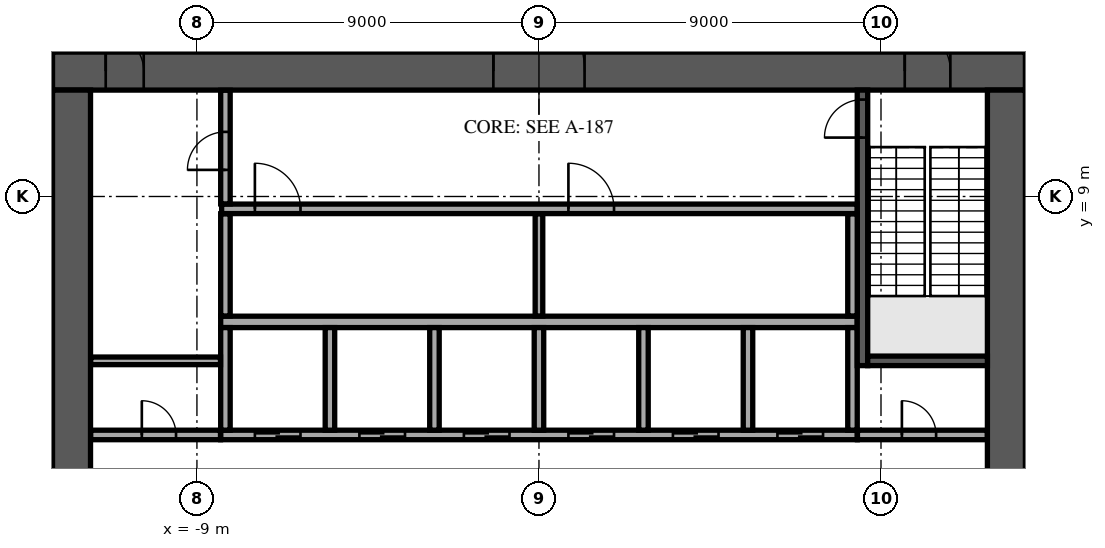
"""IFC4 building model, lengths in metres.
Left out: names, types, materials, properties, quantities, classifications, styles, units other than length and angle.
Written with IfcOpenShell. Run it as: python <this file> out.ifc"""

import sys

from ifc_helpers import new_model, si_unit, direction, frame, frame_2d, origin, place, context, subcontext, project, spatial, rectangle, extrude, element, fill, save


model = new_model("IFC4")
c1 = context("Model", 3, precision=1e-05, world=origin(), true_north=direction((0.0, 1.0)))
c2 = subcontext(c1, "Body", "Model", "MODEL_VIEW")
j1 = project(units=[si_unit("LENGTHUNIT", "METRE"), si_unit("PLANEANGLEUNIT", "RADIAN")], contexts=[c1])
p1 = place(None, origin())
s1 = spatial("IfcSite", under=j1, at=p1, CompositionType="ELEMENT")
p2 = place(p1, origin())
s2 = spatial("IfcBuilding", under=s1, at=p2, CompositionType="ELEMENT")
p3 = place(p2, frame((0.0, 0.0, 183.7)))
s3 = spatial("IfcBuildingStorey", under=s2, at=p3, CompositionType="ELEMENT", Elevation=183.7)
p4 = place(p3, frame((-12.8, 12.3, 0.0), z_axis=(0.0, 0.0, 1.0), x_axis=(1.0, 0.0, 0.0)))
e1 = element("IfcWall", 1, at=p4, inside=s3, PredefinedType="SHEAR", context=c2, shape_type="SweptSolid", body=[
    extrude(rectangle(XDim=25.6, YDim=1.0, at=frame_2d((12.8, 0.0))), origin(), (0.0, 0.0, 1.0), 5.22),
])
p5 = place(p4, frame((11.6, 0.0, 0.0)))
e2 = element("IfcOpeningElement", 2, at=p5, cuts=e1, PredefinedType="OPENING", context=c2, shape_type="SweptSolid", body=[
    extrude(rectangle(XDim=2.4, YDim=2.4, at=frame_2d((1.2, 1.2))), frame((0.0, 0.51, 0.0), z_axis=(0.0, -1.0, 0.0), x_axis=(1.0, 0.0, 0.0)), (0.0, 0.0, 1.0), 1.02),
])
p6 = place(p4, frame((22.425, 0.0, 0.0)))
e3 = element("IfcOpeningElement", 3, at=p6, cuts=e1, PredefinedType="OPENING", context=c2, shape_type="SweptSolid", body=[
    extrude(rectangle(XDim=1.2, YDim=2.1, at=frame_2d((0.6, 1.05))), frame((0.0, 0.51, 0.0), z_axis=(0.0, -1.0, 0.0), x_axis=(1.0, 0.0, 0.0)), (0.0, 0.0, 1.0), 1.02),
])
p7 = place(p4, frame((1.4, 0.0, 0.0)))
e4 = element("IfcOpeningElement", 4, at=p7, cuts=e1, PredefinedType="OPENING", context=c2, shape_type="SweptSolid", body=[
    extrude(rectangle(XDim=1.0, YDim=2.1, at=frame_2d((0.5, 1.05))), frame((0.0, 0.51, 0.0), z_axis=(0.0, -1.0, 0.0), x_axis=(1.0, 0.0, 0.0)), (0.0, 0.0, 1.0), 1.02),
])
p8 = place(p3, frame((12.3, -11.8, 0.0), z_axis=(0.0, 0.0, 1.0), x_axis=(0.0, 1.0, 0.0)))
e5 = element("IfcWall", 5, at=p8, inside=s3, PredefinedType="SHEAR", context=c2, shape_type="SweptSolid", body=[
    extrude(rectangle(XDim=23.6, YDim=1.0, at=frame_2d((11.8, 0.0))), origin(), (0.0, 0.0, 1.0), 5.22),
])
p9 = place(p8, frame((10.6, 0.0, 0.0)))
e6 = element("IfcOpeningElement", 6, at=p9, cuts=e5, PredefinedType="OPENING", context=c2, shape_type="SweptSolid", body=[
    extrude(rectangle(XDim=2.4, YDim=2.4, at=frame_2d((1.2, 1.2))), frame((0.0, 0.51, 0.0), z_axis=(0.0, -1.0, 0.0), x_axis=(1.0, 0.0, 0.0)), (0.0, 0.0, 1.0), 1.02),
])
p10 = place(p3, frame((-12.3, -11.8, 0.0), z_axis=(0.0, 0.0, 1.0), x_axis=(0.0, 1.0, 0.0)))
e7 = element("IfcWall", 7, at=p10, inside=s3, PredefinedType="SHEAR", context=c2, shape_type="SweptSolid", body=[
    extrude(rectangle(XDim=23.6, YDim=1.0, at=frame_2d((11.8, 0.0))), origin(), (0.0, 0.0, 1.0), 5.22),
])
p11 = place(p10, frame((10.6, 0.0, 0.0)))
e8 = element("IfcOpeningElement", 8, at=p11, cuts=e7, PredefinedType="OPENING", context=c2, shape_type="SweptSolid", body=[
    extrude(rectangle(XDim=2.4, YDim=2.4, at=frame_2d((1.2, 1.2))), frame((0.0, 0.51, 0.0), z_axis=(0.0, -1.0, 0.0), x_axis=(1.0, 0.0, 0.0)), (0.0, 0.0, 1.0), 1.02),
])
p12 = place(p3, frame((-8.375, 5.7, 0.0), z_axis=(0.0, 0.0, 1.0), x_axis=(1.0, 0.0, 0.0)))
e9 = element("IfcWall", 9, at=p12, inside=s3, PredefinedType="SOLIDWALL", context=c2, shape_type="SweptSolid", body=[
    extrude(rectangle(XDim=16.75, YDim=0.3, at=frame_2d((8.375, 0.0))), origin(), (0.0, 0.0, 1.0), 5.22),
])
p13 = place(p3, frame((-8.375, 2.725, 0.0), z_axis=(0.0, 0.0, 1.0), x_axis=(1.0, 0.0, 0.0)))
e10 = element("IfcWall", 10, at=p13, inside=s3, PredefinedType="SOLIDWALL", context=c2, shape_type="SweptSolid", body=[
    extrude(rectangle(XDim=16.75, YDim=0.25, at=frame_2d((8.375, 0.0))), origin(), (0.0, 0.0, 1.0), 5.22),
])
p14 = place(p13, frame((0.9, 0.0, 0.0)))
e11 = element("IfcOpeningElement", 11, at=p14, cuts=e10, PredefinedType="OPENING", context=c2, shape_type="SweptSolid", body=[
    extrude(rectangle(XDim=1.2, YDim=2.1, at=frame_2d((0.6, 1.05))), frame((0.0, 0.135, 0.0), z_axis=(0.0, -1.0, 0.0), x_axis=(1.0, 0.0, 0.0)), (0.0, 0.0, 1.0), 0.27),
])
p15 = place(p13, frame((3.65, 0.0, 0.0)))
e12 = element("IfcOpeningElement", 12, at=p15, cuts=e10, PredefinedType="OPENING", context=c2, shape_type="SweptSolid", body=[
    extrude(rectangle(XDim=1.2, YDim=2.1, at=frame_2d((0.6, 1.05))), frame((0.0, 0.135, 0.0), z_axis=(0.0, -1.0, 0.0), x_axis=(1.0, 0.0, 0.0)), (0.0, 0.0, 1.0), 0.27),
])
p16 = place(p13, frame((6.4, 0.0, 0.0)))
e13 = element("IfcOpeningElement", 13, at=p16, cuts=e10, PredefinedType="OPENING", context=c2, shape_type="SweptSolid", body=[
    extrude(rectangle(XDim=1.2, YDim=2.1, at=frame_2d((0.6, 1.05))), frame((0.0, 0.135, 0.0), z_axis=(0.0, -1.0, 0.0), x_axis=(1.0, 0.0, 0.0)), (0.0, 0.0, 1.0), 0.27),
])
p17 = place(p13, frame((9.15, 0.0, 0.0)))
e14 = element("IfcOpeningElement", 14, at=p17, cuts=e10, PredefinedType="OPENING", context=c2, shape_type="SweptSolid", body=[
    extrude(rectangle(XDim=1.2, YDim=2.1, at=frame_2d((0.6, 1.05))), frame((0.0, 0.135, 0.0), z_axis=(0.0, -1.0, 0.0), x_axis=(1.0, 0.0, 0.0)), (0.0, 0.0, 1.0), 0.27),
])
p18 = place(p13, frame((11.9, 0.0, 0.0)))
e15 = element("IfcOpeningElement", 15, at=p18, cuts=e10, PredefinedType="OPENING", context=c2, shape_type="SweptSolid", body=[
    extrude(rectangle(XDim=1.2, YDim=2.1, at=frame_2d((0.6, 1.05))), frame((0.0, 0.135, 0.0), z_axis=(0.0, -1.0, 0.0), x_axis=(1.0, 0.0, 0.0)), (0.0, 0.0, 1.0), 0.27),
])
p19 = place(p13, frame((14.65, 0.0, 0.0)))
e16 = element("IfcOpeningElement", 16, at=p19, cuts=e10, PredefinedType="OPENING", context=c2, shape_type="SweptSolid", body=[
    extrude(rectangle(XDim=1.2, YDim=2.1, at=frame_2d((0.6, 1.05))), frame((0.0, 0.135, 0.0), z_axis=(0.0, -1.0, 0.0), x_axis=(1.0, 0.0, 0.0)), (0.0, 0.0, 1.0), 0.27),
])
for number, where, z_axis, x_axis in (
    (17, (-8.25, 2.85, 0.0), (0.0, 0.0, 1.0), (0.0, 1.0, 0.0)),
    (18, (-5.5, 2.85, 0.0), (0.0, 0.0, 1.0), (0.0, 1.0, 0.0)),
    (19, (-2.75, 2.85, 0.0), (0.0, 0.0, 1.0), (0.0, 1.0, 0.0)),
    (20, (0.0, 2.85, 0.0), (0.0, 0.0, 1.0), (0.0, 1.0, 0.0)),
    (21, (2.75, 2.85, 0.0), (0.0, 0.0, 1.0), (0.0, 1.0, 0.0)),
    (22, (5.5, 2.85, 0.0), (0.0, 0.0, 1.0), (0.0, 1.0, 0.0)),
    (23, (8.25, 2.85, 0.0), (0.0, 0.0, 1.0), (0.0, 1.0, 0.0)),
):
    element("IfcWall", number, at=place(p3, frame(where, z_axis=z_axis, x_axis=x_axis)), inside=s3, PredefinedType="SOLIDWALL", context=c2, shape_type="SweptSolid", body=[
        extrude(rectangle(XDim=2.7, YDim=0.25, at=frame_2d((1.35, 0.0))), origin(), (0.0, 0.0, 1.0), 5.22),
    ])
p20 = place(p3, frame((8.512, 4.55, 0.0), z_axis=(0.0, 0.0, 1.0), x_axis=(0.0, 1.0, 0.0)))
e24 = element("IfcWall", 24, at=p20, inside=s3, PredefinedType="SOLIDWALL", context=c2, shape_type="SweptSolid", body=[
    extrude(rectangle(XDim=7.25, YDim=0.275, at=frame_2d((3.625, 0.0))), origin(), (0.0, 0.0, 1.0), 5.22),
])
p21 = place(p20, frame((6.0, 0.0, 0.0)))
e25 = element("IfcOpeningElement", 25, at=p21, cuts=e24, PredefinedType="OPENING", context=c2, shape_type="SweptSolid", body=[
    extrude(rectangle(XDim=1.0, YDim=2.1, at=frame_2d((0.5, 1.05))), frame((0.0, 0.147, 0.0), z_axis=(0.0, -1.0, 0.0), x_axis=(1.0, 0.0, 0.0)), (0.0, 0.0, 1.0), 0.295),
])
p22 = place(p3, frame((8.65, 4.675, 0.0), z_axis=(0.0, 0.0, 1.0), x_axis=(1.0, 0.0, 0.0)))
e26 = element("IfcWall", 26, at=p22, inside=s3, PredefinedType="SOLIDWALL", context=c2, shape_type="SweptSolid", body=[
    extrude(rectangle(XDim=3.15, YDim=0.25, at=frame_2d((1.575, 0.0))), origin(), (0.0, 0.0, 1.0), 5.22),
])
p23 = place(p3, frame((-11.795, 2.725, 0.0), z_axis=(0.0, 0.0, 1.0), x_axis=(1.0, 0.0, 0.0)))
e27 = element("IfcWall", 27, at=p23, inside=s3, PredefinedType="PARTITIONING", context=c2, shape_type="SweptSolid", body=[
    extrude(rectangle(XDim=3.415, YDim=0.25, at=frame_2d((1.708, 0.0))), origin(), (0.0, 0.0, 1.0), 5.22),
])
p24 = place(p23, frame((1.345, 0.0, 0.0)))
e28 = element("IfcOpeningElement", 28, at=p24, cuts=e27, PredefinedType="OPENING", context=c2, shape_type="SweptSolid", body=[
    extrude(rectangle(XDim=0.9, YDim=2.1, at=frame_2d((0.45, 1.05))), frame((0.0, 0.135, 0.0), z_axis=(0.0, -1.0, 0.0), x_axis=(1.0, 0.0, 0.0)), (0.0, 0.0, 1.0), 0.27),
])
p25 = place(p3, frame((8.38, 2.725, 0.0), z_axis=(0.0, 0.0, 1.0), x_axis=(1.0, 0.0, 0.0)))
e29 = element("IfcWall", 29, at=p25, inside=s3, PredefinedType="PARTITIONING", context=c2, shape_type="SweptSolid", body=[
    extrude(rectangle(XDim=3.415, YDim=0.25, at=frame_2d((1.708, 0.0))), origin(), (0.0, 0.0, 1.0), 5.22),
])
p26 = place(p25, frame((1.17, 0.0, 0.0)))
e30 = element("IfcOpeningElement", 30, at=p26, cuts=e29, PredefinedType="OPENING", context=c2, shape_type="SweptSolid", body=[
    extrude(rectangle(XDim=0.9, YDim=2.1, at=frame_2d((0.45, 1.05))), frame((0.0, 0.135, 0.0), z_axis=(0.0, -1.0, 0.0), x_axis=(1.0, 0.0, 0.0)), (0.0, 0.0, 1.0), 0.27),
])
p27 = place(p3, frame((-11.795, 4.675, 0.0), z_axis=(0.0, 0.0, 1.0), x_axis=(1.0, 0.0, 0.0)))
e31 = element("IfcWall", 31, at=p27, inside=s3, PredefinedType="PARTITIONING", context=c2, shape_type="SweptSolid", body=[
    extrude(rectangle(XDim=3.415, YDim=0.2, at=frame_2d((1.708, 0.0))), origin(), (0.0, 0.0, 1.0), 5.22),
])
p28 = place(p3, frame((-8.25, 5.855, 0.0), z_axis=(0.0, 0.0, 1.0), x_axis=(0.0, 1.0, 0.0)))
e32 = element("IfcWall", 32, at=p28, inside=s3, PredefinedType="PARTITIONING", context=c2, shape_type="SweptSolid", body=[
    extrude(rectangle(XDim=2.69, YDim=0.25, at=frame_2d((1.345, 0.0))), origin(), (0.0, 0.0, 1.0), 5.22),
])
p29 = place(p3, frame((0.0, 5.855, 0.0), z_axis=(0.0, 0.0, 1.0), x_axis=(0.0, 1.0, 0.0)))
e33 = element("IfcWall", 33, at=p29, inside=s3, PredefinedType="PARTITIONING", context=c2, shape_type="SweptSolid", body=[
    extrude(rectangle(XDim=2.69, YDim=0.2, at=frame_2d((1.345, 0.0))), origin(), (0.0, 0.0, 1.0), 5.22),
])
p30 = place(p3, frame((8.25, 5.855, 0.0), z_axis=(0.0, 0.0, 1.0), x_axis=(0.0, 1.0, 0.0)))
e34 = element("IfcWall", 34, at=p30, inside=s3, PredefinedType="PARTITIONING", context=c2, shape_type="SweptSolid", body=[
    extrude(rectangle(XDim=2.69, YDim=0.25, at=frame_2d((1.345, 0.0))), origin(), (0.0, 0.0, 1.0), 5.22),
])
p31 = place(p3, frame((-8.35, 8.675, 0.0), z_axis=(0.0, 0.0, 1.0), x_axis=(1.0, 0.0, 0.0)))
e35 = element("IfcWall", 35, at=p31, inside=s3, PredefinedType="PARTITIONING", context=c2, shape_type="SweptSolid", body=[
    extrude(rectangle(XDim=16.72, YDim=0.25, at=frame_2d((8.36, 0.0))), origin(), (0.0, 0.0, 1.0), 5.22),
])
p32 = place(p31, frame((0.875, 0.0, 0.0)))
e36 = element("IfcOpeningElement", 36, at=p32, cuts=e35, PredefinedType="OPENING", context=c2, shape_type="SweptSolid", body=[
    extrude(rectangle(XDim=1.2, YDim=2.1, at=frame_2d((0.6, 1.05))), frame((0.0, 0.135, 0.0), z_axis=(0.0, -1.0, 0.0), x_axis=(1.0, 0.0, 0.0)), (0.0, 0.0, 1.0), 0.27),
])
p33 = place(p31, frame((9.125, 0.0, 0.0)))
e37 = element("IfcOpeningElement", 37, at=p33, cuts=e35, PredefinedType="OPENING", context=c2, shape_type="SweptSolid", body=[
    extrude(rectangle(XDim=1.2, YDim=2.1, at=frame_2d((0.6, 1.05))), frame((0.0, 0.135, 0.0), z_axis=(0.0, -1.0, 0.0), x_axis=(1.0, 0.0, 0.0)), (0.0, 0.0, 1.0), 0.27),
])
p34 = place(p3, frame((-8.25, 8.805, 0.0), z_axis=(0.0, 0.0, 1.0), x_axis=(0.0, 1.0, 0.0)))
e38 = element("IfcWall", 38, at=p34, inside=s3, PredefinedType="PARTITIONING", context=c2, shape_type="SweptSolid", body=[
    extrude(rectangle(XDim=2.99, YDim=0.25, at=frame_2d((1.495, 0.0))), origin(), (0.0, 0.0, 1.0), 5.22),
])
p35 = place(p34, frame((0.895, 0.0, 0.0)))
e39 = element("IfcOpeningElement", 39, at=p35, cuts=e38, PredefinedType="OPENING", context=c2, shape_type="SweptSolid", body=[
    extrude(rectangle(XDim=1.0, YDim=2.1, at=frame_2d((0.5, 1.05))), frame((0.0, 0.135, 0.0), z_axis=(0.0, -1.0, 0.0), x_axis=(1.0, 0.0, 0.0)), (0.0, 0.0, 1.0), 0.27),
])
p36 = place(p3, frame((2.615, 35.702, 0.0), z_axis=(0.0, 0.0, 1.0), x_axis=(-0.777144452625, -0.629322254297, 0.0)))
e40 = element("IfcWall", 40, at=p36, inside=s3, PredefinedType="STANDARD", context=c2, shape_type="SweptSolid", body=[
    extrude(rectangle(XDim=49.376, YDim=0.6, at=frame_2d((24.688, 0.0))), origin(), (0.0, 0.0, 1.0), 5.22),
])
p37 = place(p36, frame((1.2, 0.0, 0.6)))
e41 = element("IfcOpeningElement", 41, at=p37, cuts=e40, PredefinedType="OPENING", context=c2, shape_type="SweptSolid", body=[
    extrude(rectangle(XDim=2.1, YDim=4.17, at=frame_2d((1.05, 2.085))), frame((0.0, 0.31, 0.0), z_axis=(0.0, -1.0, 0.0), x_axis=(1.0, 0.0, 0.0)), (0.0, 0.0, 1.0), 0.62),
])
p38 = place(p36, frame((5.7, 0.0, 0.6)))
e42 = element("IfcOpeningElement", 42, at=p38, cuts=e40, PredefinedType="OPENING", context=c2, shape_type="SweptSolid", body=[
    extrude(rectangle(XDim=2.1, YDim=4.17, at=frame_2d((1.05, 2.085))), frame((0.0, 0.31, 0.0), z_axis=(0.0, -1.0, 0.0), x_axis=(1.0, 0.0, 0.0)), (0.0, 0.0, 1.0), 0.62),
])
p39 = place(p36, frame((10.2, 0.0, 0.6)))
e43 = element("IfcOpeningElement", 43, at=p39, cuts=e40, PredefinedType="OPENING", context=c2, shape_type="SweptSolid", body=[
    extrude(rectangle(XDim=2.1, YDim=4.17, at=frame_2d((1.05, 2.085))), frame((0.0, 0.31, 0.0), z_axis=(0.0, -1.0, 0.0), x_axis=(1.0, 0.0, 0.0)), (0.0, 0.0, 1.0), 0.62),
])
p40 = place(p36, frame((19.2, 0.0, 0.6)))
e44 = element("IfcOpeningElement", 44, at=p40, cuts=e40, PredefinedType="OPENING", context=c2, shape_type="SweptSolid", body=[
    extrude(rectangle(XDim=2.1, YDim=4.17, at=frame_2d((1.05, 2.085))), frame((0.0, 0.31, 0.0), z_axis=(0.0, -1.0, 0.0), x_axis=(1.0, 0.0, 0.0)), (0.0, 0.0, 1.0), 0.62),
])
p41 = place(p36, frame((41.7, 0.0, 0.6)))
e45 = element("IfcOpeningElement", 45, at=p41, cuts=e40, PredefinedType="OPENING", context=c2, shape_type="SweptSolid", body=[
    extrude(rectangle(XDim=2.1, YDim=4.17, at=frame_2d((1.05, 2.085))), frame((0.0, 0.31, 0.0), z_axis=(0.0, -1.0, 0.0), x_axis=(1.0, 0.0, 0.0)), (0.0, 0.0, 1.0), 0.62),
])
p42 = place(p36, frame((46.138, 0.0, 0.6)))
e46 = element("IfcOpeningElement", 46, at=p42, cuts=e40, PredefinedType="OPENING", context=c2, shape_type="SweptSolid", body=[
    extrude(rectangle(XDim=2.1, YDim=4.17, at=frame_2d((1.05, 2.085))), frame((0.0, 0.31, 0.0), z_axis=(0.0, -1.0, 0.0), x_axis=(1.0, 0.0, 0.0)), (0.0, 0.0, 1.0), 0.62),
])
p43 = place(p3, frame((36.47, 2.156, 0.0), z_axis=(0.0, 0.0, 1.0), x_axis=(-0.62932061547, 0.777145779725, 0.0)))
e47 = element("IfcWall", 47, at=p43, inside=s3, PredefinedType="STANDARD", context=c2, shape_type="SweptSolid", body=[
    extrude(rectangle(XDim=42.176, YDim=0.6, at=frame_2d((21.088, 0.0))), origin(), (0.0, 0.0, 1.0), 5.22),
])
p44 = place(p43, frame((1.138, 0.0, 0.6)))
e48 = element("IfcOpeningElement", 48, at=p44, cuts=e47, PredefinedType="OPENING", context=c2, shape_type="SweptSolid", body=[
    extrude(rectangle(XDim=2.3, YDim=4.17, at=frame_2d((1.15, 2.085))), frame((0.0, 0.31, 0.0), z_axis=(0.0, -1.0, 0.0), x_axis=(1.0, 0.0, 0.0)), (0.0, 0.0, 1.0), 0.62),
])
p45 = place(p43, frame((5.776, 0.0, 0.6)))
e49 = element("IfcOpeningElement", 49, at=p45, cuts=e47, PredefinedType="OPENING", context=c2, shape_type="SweptSolid", body=[
    extrude(rectangle(XDim=2.3, YDim=4.17, at=frame_2d((1.15, 2.085))), frame((0.0, 0.31, 0.0), z_axis=(0.0, -1.0, 0.0), x_axis=(1.0, 0.0, 0.0)), (0.0, 0.0, 1.0), 0.62),
])
p46 = place(p43, frame((33.976, 0.0, 0.6)))
e50 = element("IfcOpeningElement", 50, at=p46, cuts=e47, PredefinedType="OPENING", context=c2, shape_type="SweptSolid", body=[
    extrude(rectangle(XDim=2.3, YDim=4.17, at=frame_2d((1.15, 2.085))), frame((0.0, 0.31, 0.0), z_axis=(0.0, -1.0, 0.0), x_axis=(1.0, 0.0, 0.0)), (0.0, 0.0, 1.0), 0.62),
])
p47 = place(p43, frame((38.676, 0.0, 0.6)))
e51 = element("IfcOpeningElement", 51, at=p47, cuts=e47, PredefinedType="OPENING", context=c2, shape_type="SweptSolid", body=[
    extrude(rectangle(XDim=2.3, YDim=4.17, at=frame_2d((1.15, 2.085))), frame((0.0, 0.31, 0.0), z_axis=(0.0, -1.0, 0.0), x_axis=(1.0, 0.0, 0.0)), (0.0, 0.0, 1.0), 0.62),
])
p48 = place(p5, origin())
e52 = element("IfcDoor", 52, at=p48, inside=s3, OperationType="SINGLE_SWING_LEFT", PredefinedType="DOOR", context=c2, shape_type="SweptSolid", body=[
    extrude(rectangle(XDim=2.4, YDim=2.4, at=frame_2d((1.2, 1.2))), frame((0.0, 0.025, 0.0), z_axis=(0.0, -1.0, 0.0), x_axis=(1.0, 0.0, 0.0)), (0.0, 0.0, 1.0), 0.05),
])
fill(e2, e52)
p49 = place(p6, origin())
e53 = element("IfcDoor", 53, at=p49, inside=s3, OperationType="SINGLE_SWING_LEFT", PredefinedType="DOOR", context=c2, shape_type="SweptSolid", body=[
    extrude(rectangle(XDim=1.2, YDim=2.1, at=frame_2d((0.6, 1.05))), frame((0.0, 0.025, 0.0), z_axis=(0.0, -1.0, 0.0), x_axis=(1.0, 0.0, 0.0)), (0.0, 0.0, 1.0), 0.05),
])
fill(e3, e53)
p50 = place(p7, origin())
e54 = element("IfcDoor", 54, at=p50, inside=s3, OperationType="SINGLE_SWING_LEFT", PredefinedType="DOOR", context=c2, shape_type="SweptSolid", body=[
    extrude(rectangle(XDim=1.0, YDim=2.1, at=frame_2d((0.5, 1.05))), frame((0.0, 0.025, 0.0), z_axis=(0.0, -1.0, 0.0), x_axis=(1.0, 0.0, 0.0)), (0.0, 0.0, 1.0), 0.05),
])
fill(e4, e54)
p51 = place(p14, origin())
e55 = element("IfcDoor", 55, at=p51, inside=s3, OperationType="DOUBLE_DOOR_SLIDING", PredefinedType="DOOR", context=c2, shape_type="SweptSolid", body=[
    extrude(rectangle(XDim=1.2, YDim=2.1, at=frame_2d((0.6, 1.05))), frame((0.0, 0.025, 0.0), z_axis=(0.0, -1.0, 0.0), x_axis=(1.0, 0.0, 0.0)), (0.0, 0.0, 1.0), 0.05),
])
fill(e11, e55)
p52 = place(p15, origin())
e56 = element("IfcDoor", 56, at=p52, inside=s3, OperationType="DOUBLE_DOOR_SLIDING", PredefinedType="DOOR", context=c2, shape_type="SweptSolid", body=[
    extrude(rectangle(XDim=1.2, YDim=2.1, at=frame_2d((0.6, 1.05))), frame((0.0, 0.025, 0.0), z_axis=(0.0, -1.0, 0.0), x_axis=(1.0, 0.0, 0.0)), (0.0, 0.0, 1.0), 0.05),
])
fill(e12, e56)
p53 = place(p16, origin())
e57 = element("IfcDoor", 57, at=p53, inside=s3, OperationType="DOUBLE_DOOR_SLIDING", PredefinedType="DOOR", context=c2, shape_type="SweptSolid", body=[
    extrude(rectangle(XDim=1.2, YDim=2.1, at=frame_2d((0.6, 1.05))), frame((0.0, 0.025, 0.0), z_axis=(0.0, -1.0, 0.0), x_axis=(1.0, 0.0, 0.0)), (0.0, 0.0, 1.0), 0.05),
])
fill(e13, e57)
p54 = place(p17, origin())
e58 = element("IfcDoor", 58, at=p54, inside=s3, OperationType="DOUBLE_DOOR_SLIDING", PredefinedType="DOOR", context=c2, shape_type="SweptSolid", body=[
    extrude(rectangle(XDim=1.2, YDim=2.1, at=frame_2d((0.6, 1.05))), frame((0.0, 0.025, 0.0), z_axis=(0.0, -1.0, 0.0), x_axis=(1.0, 0.0, 0.0)), (0.0, 0.0, 1.0), 0.05),
])
fill(e14, e58)
p55 = place(p18, origin())
e59 = element("IfcDoor", 59, at=p55, inside=s3, OperationType="DOUBLE_DOOR_SLIDING", PredefinedType="DOOR", context=c2, shape_type="SweptSolid", body=[
    extrude(rectangle(XDim=1.2, YDim=2.1, at=frame_2d((0.6, 1.05))), frame((0.0, 0.025, 0.0), z_axis=(0.0, -1.0, 0.0), x_axis=(1.0, 0.0, 0.0)), (0.0, 0.0, 1.0), 0.05),
])
fill(e15, e59)
p56 = place(p19, origin())
e60 = element("IfcDoor", 60, at=p56, inside=s3, OperationType="DOUBLE_DOOR_SLIDING", PredefinedType="DOOR", context=c2, shape_type="SweptSolid", body=[
    extrude(rectangle(XDim=1.2, YDim=2.1, at=frame_2d((0.6, 1.05))), frame((0.0, 0.025, 0.0), z_axis=(0.0, -1.0, 0.0), x_axis=(1.0, 0.0, 0.0)), (0.0, 0.0, 1.0), 0.05),
])
fill(e16, e60)
p57 = place(p21, origin())
e61 = element("IfcDoor", 61, at=p57, inside=s3, OperationType="SINGLE_SWING_LEFT", PredefinedType="DOOR", context=c2, shape_type="SweptSolid", body=[
    extrude(rectangle(XDim=1.0, YDim=2.1, at=frame_2d((0.5, 1.05))), frame((0.0, 0.025, 0.0), z_axis=(0.0, -1.0, 0.0), x_axis=(1.0, 0.0, 0.0)), (0.0, 0.0, 1.0), 0.05),
])
fill(e25, e61)
p58 = place(p26, origin())
e62 = element("IfcDoor", 62, at=p58, inside=s3, OperationType="SINGLE_SWING_RIGHT", PredefinedType="DOOR", context=c2, shape_type="SweptSolid", body=[
    extrude(rectangle(XDim=0.9, YDim=2.1, at=frame_2d((0.45, 1.05))), frame((0.0, 0.025, 0.0), z_axis=(0.0, -1.0, 0.0), x_axis=(1.0, 0.0, 0.0)), (0.0, 0.0, 1.0), 0.05),
])
fill(e30, e62)
p59 = place(p24, origin())
e63 = element("IfcDoor", 63, at=p59, inside=s3, OperationType="SINGLE_SWING_RIGHT", PredefinedType="DOOR", context=c2, shape_type="SweptSolid", body=[
    extrude(rectangle(XDim=0.9, YDim=2.1, at=frame_2d((0.45, 1.05))), frame((0.0, 0.025, 0.0), z_axis=(0.0, -1.0, 0.0), x_axis=(1.0, 0.0, 0.0)), (0.0, 0.0, 1.0), 0.05),
])
fill(e28, e63)
p60 = place(p35, origin())
e64 = element("IfcDoor", 64, at=p60, inside=s3, OperationType="SINGLE_SWING_RIGHT", PredefinedType="DOOR", context=c2, shape_type="SweptSolid", body=[
    extrude(rectangle(XDim=1.0, YDim=2.1, at=frame_2d((0.5, 1.05))), frame((0.0, 0.025, 0.0), z_axis=(0.0, -1.0, 0.0), x_axis=(1.0, 0.0, 0.0)), (0.0, 0.0, 1.0), 0.05),
])
fill(e39, e64)
p61 = place(p32, origin())
e65 = element("IfcDoor", 65, at=p61, inside=s3, OperationType="SINGLE_SWING_LEFT", PredefinedType="DOOR", context=c2, shape_type="SweptSolid", body=[
    extrude(rectangle(XDim=1.2, YDim=2.1, at=frame_2d((0.6, 1.05))), frame((0.0, 0.025, 0.0), z_axis=(0.0, -1.0, 0.0), x_axis=(1.0, 0.0, 0.0)), (0.0, 0.0, 1.0), 0.05),
])
fill(e36, e65)
p62 = place(p33, origin())
e66 = element("IfcDoor", 66, at=p62, inside=s3, OperationType="SINGLE_SWING_LEFT", PredefinedType="DOOR", context=c2, shape_type="SweptSolid", body=[
    extrude(rectangle(XDim=1.2, YDim=2.1, at=frame_2d((0.6, 1.05))), frame((0.0, 0.025, 0.0), z_axis=(0.0, -1.0, 0.0), x_axis=(1.0, 0.0, 0.0)), (0.0, 0.0, 1.0), 0.05),
])
fill(e37, e66)
save(model, sys.argv[1])
